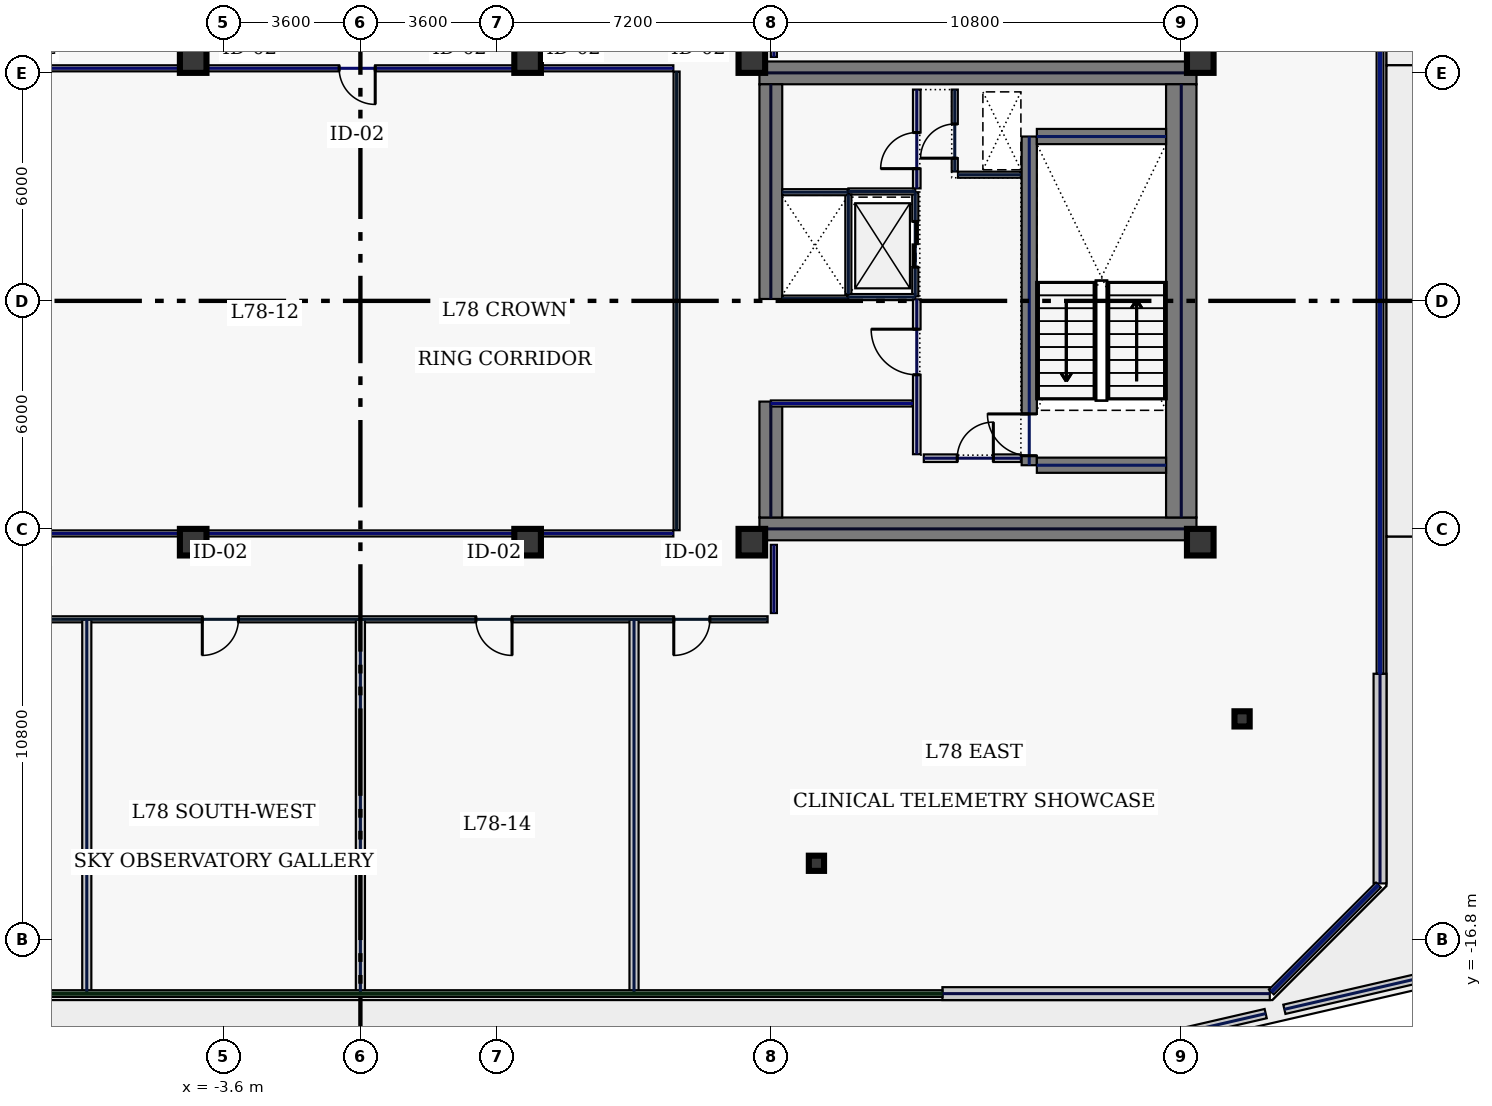
"""IFC4 building model, lengths in metres.
Left out: names, types, materials, properties, quantities, classifications, styles, units other than length and angle.
Written with IfcOpenShell. Run it as: python <this file> out.ifc"""

import sys

from ifc_helpers import new_model, si_unit, direction, frame, frame_2d, origin, origin_2d, place, context, subcontext, project, spatial, rectangle, hollow_rectangle, extrude, element, fill, save


model = new_model("IFC4")
c1 = context("Model", 3, precision=1e-05, world=origin(), true_north=direction((0.0, 1.0)))
c2 = subcontext(c1, "Body", "Model", "MODEL_VIEW")
j1 = project(units=[si_unit("LENGTHUNIT", "METRE"), si_unit("PLANEANGLEUNIT", "RADIAN")], contexts=[c1])
p1 = place(None, origin())
s1 = spatial("IfcSite", under=j1, at=p1, CompositionType="ELEMENT")
p2 = place(p1, origin())
s2 = spatial("IfcBuilding", under=s1, at=p2, CompositionType="ELEMENT")
p3 = place(p2, frame((0.0, 0.0, 333.0)))
s3 = spatial("IfcBuildingStorey", under=s2, at=p3, CompositionType="ELEMENT", Elevation=333.0)
for number, where, z_axis, x_axis in (
    (1, (10.5, 6.0, 0.0), (0.0, 0.0, 1.0), (1.0, 0.0, 0.0)),
    (2, (10.5, -6.0, 0.0), (0.0, 0.0, 1.0), (1.0, 0.0, 0.0)),
):
    element("IfcWall", number, at=place(p3, frame(where, z_axis=z_axis, x_axis=x_axis)), inside=s3, PredefinedType="SHEAR", context=c2, shape_type="SweptSolid", body=[
        extrude(rectangle(XDim=11.5, YDim=0.6, at=frame_2d((5.75, 0.0))), origin(), (0.0, 0.0, 1.0), 6.5),
    ])
p4 = place(p3, frame((21.6, -5.7, 0.0), z_axis=(0.0, 0.0, 1.0), x_axis=(0.0, 1.0, 0.0)))
e3 = element("IfcWall", 3, at=p4, inside=s3, PredefinedType="SHEAR", context=c2, shape_type="SweptSolid", body=[
    extrude(rectangle(XDim=11.4, YDim=0.8, at=frame_2d((5.7, 0.0))), origin(), (0.0, 0.0, 1.0), 6.5),
])
p5 = place(p3, frame((10.8, -5.7, 0.0), z_axis=(0.0, 0.0, 1.0), x_axis=(0.0, 1.0, 0.0)))
e4 = element("IfcWall", 4, at=p5, inside=s3, PredefinedType="SHEAR", context=c2, shape_type="SweptSolid", body=[
    extrude(rectangle(XDim=3.05, YDim=0.6, at=frame_2d((1.525, 0.0))), origin(), (0.0, 0.0, 1.0), 6.5),
])
p6 = place(p3, frame((10.8, 0.05, 0.0), z_axis=(0.0, 0.0, 1.0), x_axis=(0.0, 1.0, 0.0)))
e5 = element("IfcWall", 5, at=p6, inside=s3, PredefinedType="SHEAR", context=c2, shape_type="SweptSolid", body=[
    extrude(rectangle(XDim=5.65, YDim=0.6, at=frame_2d((2.825, 0.0))), origin(), (0.0, 0.0, 1.0), 6.5),
])
p7 = place(p3, frame((17.6, -4.325, 0.0), z_axis=(0.0, 0.0, 1.0), x_axis=(0.0, 1.0, 0.0)))
e6 = element("IfcWall", 6, at=p7, inside=s3, PredefinedType="SHEAR", context=c2, shape_type="SweptSolid", body=[
    extrude(rectangle(XDim=8.65, YDim=0.4, at=frame_2d((4.325, 0.0))), origin(), (0.0, 0.0, 1.0), 6.5),
])
p8 = place(p7, frame((0.25, 0.0, 0.0)))
e7 = element("IfcOpeningElement", 7, at=p8, cuts=e6, PredefinedType="OPENING", context=c2, shape_type="SweptSolid", body=[
    extrude(rectangle(XDim=1.1, YDim=2.2, at=frame_2d((0.55, 1.1))), frame((0.0, 0.21, 0.0), z_axis=(0.0, -1.0, 0.0), x_axis=(1.0, 0.0, 0.0)), (0.0, 0.0, 1.0), 0.42),
])
for number, where, z_axis, x_axis in (
    (8, (17.8, -4.325, 0.0), (0.0, 0.0, 1.0), (1.0, 0.0, 0.0)),
    (9, (17.8, 4.325, 0.0), (0.0, 0.0, 1.0), (1.0, 0.0, 0.0)),
):
    element("IfcWall", number, at=place(p3, frame(where, z_axis=z_axis, x_axis=x_axis)), inside=s3, PredefinedType="SHEAR", context=c2, shape_type="SweptSolid", body=[
        extrude(rectangle(XDim=3.4, YDim=0.4, at=frame_2d((1.7, 0.0))), origin(), (0.0, 0.0, 1.0), 6.5),
    ])
for number, where, z_axis, x_axis in (
    (10, (10.3, -6.35, 0.0), (0.0, 0.0, 1.0), (1.0, 0.0, 0.0)),
    (11, (10.3, 6.35, 0.0), (0.0, 0.0, 1.0), (1.0, 0.0, 0.0)),
    (12, (22.1, -6.35, 0.0), (0.0, 0.0, 1.0), (1.0, 0.0, 0.0)),
    (13, (22.1, 6.35, 0.0), (0.0, 0.0, 1.0), (1.0, 0.0, 0.0)),
    (14, (-4.4, -6.35, 0.0), (0.0, 0.0, 1.0), (1.0, 0.0, 0.0)),
    (15, (4.4, -6.35, 0.0), (0.0, 0.0, 1.0), (1.0, 0.0, 0.0)),
    (16, (-4.4, 6.35, 0.0), (0.0, 0.0, 1.0), (1.0, 0.0, 0.0)),
    (17, (4.4, 6.35, 0.0), (0.0, 0.0, 1.0), (1.0, 0.0, 0.0)),
):
    element("IfcColumn", number, at=place(p3, frame(where, z_axis=z_axis, x_axis=x_axis)), inside=s3, PredefinedType="COLUMN", context=c2, shape_type="SweptSolid", body=[
        extrude(hollow_rectangle(XDim=0.7, YDim=0.7, WallThickness=0.032, at=origin_2d()), origin(), (0.0, 0.0, 1.0), 6.5),
    ])
for number, where, z_axis, x_axis in (
    (18, (23.2, -11.0, 0.0), (0.0, 0.0, 1.0), (1.0, 0.0, 0.0)),
    (19, (0.0, -14.8, 0.0), (0.0, 0.0, 1.0), (1.0, 0.0, 0.0)),
    (20, (12.0, -14.8, 0.0), (0.0, 0.0, 1.0), (1.0, 0.0, 0.0)),
):
    element("IfcColumn", number, at=place(p3, frame(where, z_axis=z_axis, x_axis=x_axis)), inside=s3, PredefinedType="COLUMN", context=c2, shape_type="SweptSolid", body=[
        extrude(hollow_rectangle(XDim=0.4, YDim=0.4, WallThickness=0.02, at=origin_2d()), origin(), (0.0, 0.0, 1.0), 6.5),
    ])
p9 = place(p3, frame((27.356, 10.321, 0.0), z_axis=(0.0, 0.0, 1.0), x_axis=(0.224955106174, -0.974369129338, 0.0)))
e21 = element("IfcWall", 21, at=p9, inside=s3, PredefinedType="PARAPET", context=c2, shape_type="SweptSolid", body=[
    extrude(rectangle(XDim=22.941, YDim=0.25, at=frame_2d((11.47, 0.0))), origin(), (0.0, 0.0, 1.0), 1.15),
])
p10 = place(p3, frame((29.072, -17.544, 0.0), z_axis=(0.0, 0.0, 1.0), x_axis=(-0.974367604085, -0.224961712541, 0.0)))
e22 = element("IfcWall", 22, at=p10, inside=s3, PredefinedType="PARAPET", context=c2, shape_type="SweptSolid", body=[
    extrude(rectangle(XDim=4.885, YDim=0.25, at=frame_2d((2.442, 0.0))), origin(), (0.0, 0.0, 1.0), 1.15),
])
p11 = place(p3, frame((23.822, -18.756, 0.0), z_axis=(0.0, 0.0, 1.0), x_axis=(-0.97437013751, -0.22495073934, 0.0)))
e23 = element("IfcWall", 23, at=p11, inside=s3, PredefinedType="PARAPET", context=c2, shape_type="SweptSolid", body=[
    extrude(rectangle(XDim=48.859, YDim=0.25, at=frame_2d((24.43, 0.0))), origin(), (0.0, 0.0, 1.0), 1.15),
])
p12 = place(p3, frame((26.83, -9.811, 0.0), z_axis=(0.0, 0.0, 1.0), x_axis=(0.0, -1.0, 0.0)))
e24 = element("IfcWall", 24, at=p12, inside=s3, PredefinedType="STANDARD", context=c2, shape_type="SweptSolid", body=[
    extrude(rectangle(XDim=5.518, YDim=0.34, at=frame_2d((2.759, 0.0))), origin(), (0.0, 0.0, 1.0), 6.5),
])
p13 = place(p3, frame((23.93, -18.23, 0.0), z_axis=(0.0, 0.0, 1.0), x_axis=(-1.0, 0.0, 0.0)))
e25 = element("IfcWall", 25, at=p13, inside=s3, PredefinedType="STANDARD", context=c2, shape_type="SweptSolid", body=[
    extrude(rectangle(XDim=8.615, YDim=0.34, at=frame_2d((4.308, 0.0))), origin(), (0.0, 0.0, 1.0), 6.5),
])
p14 = place(p3, frame((14.6, 0.12, 0.0), z_axis=(0.0, 0.0, 1.0), x_axis=(0.0, 1.0, 0.0)))
e26 = element("IfcWall", 26, at=p14, inside=s3, PredefinedType="PARTITIONING", context=c2, shape_type="SweptSolid", body=[
    extrude(rectangle(XDim=2.74, YDim=0.16, at=frame_2d((1.37, 0.0))), origin(), (0.0, 0.0, 1.0), 6.5),
])
p15 = place(p14, frame((0.77, 0.0, 0.0)))
e27 = element("IfcOpeningElement", 27, at=p15, cuts=e26, PredefinedType="OPENING", context=c2, shape_type="SweptSolid", body=[
    extrude(rectangle(XDim=1.2, YDim=2.2, at=frame_2d((0.6, 1.1))), frame((0.0, 0.09, 0.0), z_axis=(0.0, -1.0, 0.0), x_axis=(1.0, 0.0, 0.0)), (0.0, 0.0, 1.0), 0.18),
])
for number, where, z_axis, x_axis in (
    (28, (12.84, 0.1, 0.0), (0.0, 0.0, 1.0), (1.0, 0.0, 0.0)),
    (29, (12.84, 2.88, 0.0), (0.0, 0.0, 1.0), (1.0, 0.0, 0.0)),
):
    element("IfcWall", number, at=place(p3, frame(where, z_axis=z_axis, x_axis=x_axis)), inside=s3, PredefinedType="PARTITIONING", context=c2, shape_type="SweptSolid", body=[
        extrude(rectangle(XDim=1.76, YDim=0.16, at=frame_2d((0.88, 0.0))), origin(), (0.0, 0.0, 1.0), 6.5),
    ])
p16 = place(p3, frame((12.84, 0.18, 0.0), z_axis=(0.0, 0.0, 1.0), x_axis=(0.0, 1.0, 0.0)))
e30 = element("IfcWall", 30, at=p16, inside=s3, PredefinedType="PARTITIONING", context=c2, shape_type="SweptSolid", body=[
    extrude(rectangle(XDim=2.62, YDim=0.16, at=frame_2d((1.31, 0.0))), origin(), (0.0, 0.0, 1.0), 6.5),
])
for number, where, z_axis, x_axis in (
    (31, (11.1, 0.06, 0.0), (0.0, 0.0, 1.0), (1.0, 0.0, 0.0)),
    (32, (11.1, 2.86, 0.0), (0.0, 0.0, 1.0), (1.0, 0.0, 0.0)),
):
    element("IfcWall", number, at=place(p3, frame(where, z_axis=z_axis, x_axis=x_axis)), inside=s3, PredefinedType="PARTITIONING", context=c2, shape_type="SweptSolid", body=[
        extrude(rectangle(XDim=1.72, YDim=0.16, at=frame_2d((0.86, 0.0))), origin(), (0.0, 0.0, 1.0), 6.5),
    ])
p17 = place(p3, frame((15.64, 3.405, 0.0), z_axis=(0.0, 0.0, 1.0), x_axis=(0.0, 1.0, 0.0)))
e33 = element("IfcWall", 33, at=p17, inside=s3, PredefinedType="PARTITIONING", context=c2, shape_type="SweptSolid", body=[
    extrude(rectangle(XDim=2.155, YDim=0.16, at=frame_2d((1.078, 0.0))), origin(), (0.0, 0.0, 1.0), 6.5),
])
p18 = place(p17, frame((0.35, 0.0, 0.0)))
e34 = element("IfcOpeningElement", 34, at=p18, cuts=e33, PredefinedType="OPENING", context=c2, shape_type="SweptSolid", body=[
    extrude(rectangle(XDim=0.9, YDim=2.2, at=frame_2d((0.45, 1.1))), frame((0.0, 0.09, 0.0), z_axis=(0.0, -1.0, 0.0), x_axis=(1.0, 0.0, 0.0)), (0.0, 0.0, 1.0), 0.18),
])
p19 = place(p3, frame((15.725, 3.32, 0.0), z_axis=(0.0, 0.0, 1.0), x_axis=(1.0, 0.0, 0.0)))
e35 = element("IfcWall", 35, at=p19, inside=s3, PredefinedType="PARTITIONING", context=c2, shape_type="SweptSolid", body=[
    extrude(rectangle(XDim=1.655, YDim=0.16, at=frame_2d((0.827, 0.0))), origin(), (0.0, 0.0, 1.0), 6.5),
])
p20 = place(p3, frame((14.825, -4.14, 0.0), z_axis=(0.0, 0.0, 1.0), x_axis=(1.0, 0.0, 0.0)))
e36 = element("IfcWall", 36, at=p20, inside=s3, PredefinedType="SOLIDWALL", context=c2, shape_type="SweptSolid", body=[
    extrude(rectangle(XDim=2.555, YDim=0.2, at=frame_2d((1.277, 0.0))), origin(), (0.0, 0.0, 1.0), 6.5),
])
p21 = place(p20, frame((0.88, 0.0, 0.0)))
e37 = element("IfcOpeningElement", 37, at=p21, cuts=e36, PredefinedType="OPENING", context=c2, shape_type="SweptSolid", body=[
    extrude(rectangle(XDim=0.95, YDim=2.2, at=frame_2d((0.475, 1.1))), frame((0.0, 0.11, 0.0), z_axis=(0.0, -1.0, 0.0), x_axis=(1.0, 0.0, 0.0)), (0.0, 0.0, 1.0), 0.22),
])
p22 = place(p3, frame((10.8, -2.7, 0.0), z_axis=(0.0, 0.0, 1.0), x_axis=(1.0, 0.0, 0.0)))
e38 = element("IfcWall", 38, at=p22, inside=s3, PredefinedType="PARTITIONING", context=c2, shape_type="SweptSolid", body=[
    extrude(rectangle(XDim=3.735, YDim=0.16, at=frame_2d((1.867, 0.0))), origin(), (0.0, 0.0, 1.0), 6.5),
])
p23 = place(p3, frame((14.64, 2.96, 0.0), z_axis=(0.0, 0.0, 1.0), x_axis=(0.0, 1.0, 0.0)))
e39 = element("IfcWall", 39, at=p23, inside=s3, PredefinedType="SOLIDWALL", context=c2, shape_type="SweptSolid", body=[
    extrude(rectangle(XDim=2.6, YDim=0.2, at=frame_2d((1.3, 0.0))), origin(), (0.0, 0.0, 1.0), 6.5),
])
p24 = place(p23, frame((0.52, 0.0, 0.0)))
e40 = element("IfcOpeningElement", 40, at=p24, cuts=e39, PredefinedType="OPENING", context=c2, shape_type="SweptSolid", body=[
    extrude(rectangle(XDim=0.95, YDim=2.2, at=frame_2d((0.475, 1.1))), frame((0.0, 0.11, 0.0), z_axis=(0.0, -1.0, 0.0), x_axis=(1.0, 0.0, 0.0)), (0.0, 0.0, 1.0), 0.22),
])
p25 = place(p3, frame((14.64, -4.035, 0.0), z_axis=(0.0, 0.0, 1.0), x_axis=(0.0, 1.0, 0.0)))
e41 = element("IfcWall", 41, at=p25, inside=s3, PredefinedType="SOLIDWALL", context=c2, shape_type="SweptSolid", body=[
    extrude(rectangle(XDim=4.075, YDim=0.2, at=frame_2d((2.038, 0.0))), origin(), (0.0, 0.0, 1.0), 6.5),
])
p26 = place(p25, frame((2.09, 0.0, 0.0)))
e42 = element("IfcOpeningElement", 42, at=p26, cuts=e41, PredefinedType="OPENING", context=c2, shape_type="SweptSolid", body=[
    extrude(rectangle(XDim=1.2, YDim=2.2, at=frame_2d((0.6, 1.1))), frame((0.0, 0.11, 0.0), z_axis=(0.0, -1.0, 0.0), x_axis=(1.0, 0.0, 0.0)), (0.0, 0.0, 1.0), 0.22),
])
for number, where, z_axis, x_axis in (
    (43, (10.88, 8.215, 0.0), (0.0, 0.0, 1.0), (0.0, -1.0, 0.0)),
    (44, (10.88, -6.42, 0.0), (0.0, 0.0, 1.0), (0.0, -1.0, 0.0)),
):
    element("IfcWall", number, at=place(p3, frame(where, z_axis=z_axis, x_axis=x_axis)), inside=s3, PredefinedType="PARTITIONING", context=c2, shape_type="SweptSolid", body=[
        extrude(rectangle(XDim=1.795, YDim=0.16, at=frame_2d((0.897, 0.0))), origin(), (0.0, 0.0, 1.0), 4.895),
    ])
p27 = place(p3, frame((10.715, -8.38, 0.0), z_axis=(0.0, 0.0, 1.0), x_axis=(-1.0, 0.0, 0.0)))
e45 = element("IfcWall", 45, at=p27, inside=s3, PredefinedType="PARTITIONING", context=c2, shape_type="SweptSolid", body=[
    extrude(rectangle(XDim=21.43, YDim=0.16, at=frame_2d((10.715, 0.0))), origin(), (0.0, 0.0, 1.0), 6.5),
])
p28 = place(p27, frame((13.925, 0.0, 0.0)))
e46 = element("IfcOpeningElement", 46, at=p28, cuts=e45, PredefinedType="OPENING", context=c2, shape_type="SweptSolid", body=[
    extrude(rectangle(XDim=0.95, YDim=2.2, at=frame_2d((0.475, 1.1))), frame((0.0, 0.09, 0.0), z_axis=(0.0, -1.0, 0.0), x_axis=(1.0, 0.0, 0.0)), (0.0, 0.0, 1.0), 0.18),
])
p29 = place(p27, frame((6.725, 0.0, 0.0)))
e47 = element("IfcOpeningElement", 47, at=p29, cuts=e45, PredefinedType="OPENING", context=c2, shape_type="SweptSolid", body=[
    extrude(rectangle(XDim=0.95, YDim=2.2, at=frame_2d((0.475, 1.1))), frame((0.0, 0.09, 0.0), z_axis=(0.0, -1.0, 0.0), x_axis=(1.0, 0.0, 0.0)), (0.0, 0.0, 1.0), 0.18),
])
p30 = place(p27, frame((19.131, 0.0, 0.0)))
e48 = element("IfcOpeningElement", 48, at=p30, cuts=e45, PredefinedType="OPENING", context=c2, shape_type="SweptSolid", body=[
    extrude(rectangle(XDim=0.95, YDim=2.2, at=frame_2d((0.475, 1.1))), frame((0.0, 0.09, 0.0), z_axis=(0.0, -1.0, 0.0), x_axis=(1.0, 0.0, 0.0)), (0.0, 0.0, 1.0), 0.18),
])
p31 = place(p27, frame((1.519, 0.0, 0.0)))
e49 = element("IfcOpeningElement", 49, at=p31, cuts=e45, PredefinedType="OPENING", context=c2, shape_type="SweptSolid", body=[
    extrude(rectangle(XDim=0.95, YDim=2.2, at=frame_2d((0.475, 1.1))), frame((0.0, 0.09, 0.0), z_axis=(0.0, -1.0, 0.0), x_axis=(1.0, 0.0, 0.0)), (0.0, 0.0, 1.0), 0.18),
])
p32 = place(p3, frame((8.32, -6.035, 0.0), z_axis=(0.0, 0.0, 1.0), x_axis=(0.0, 1.0, 0.0)))
e50 = element("IfcWall", 50, at=p32, inside=s3, PredefinedType="PARTITIONING", context=c2, shape_type="SweptSolid", body=[
    extrude(rectangle(XDim=12.07, YDim=0.16, at=frame_2d((6.035, 0.0))), origin(), (0.0, 0.0, 1.0), 6.5),
])
p33 = place(p3, frame((8.235, 6.12, 0.0), z_axis=(0.0, 0.0, 1.0), x_axis=(-1.0, 0.0, 0.0)))
e51 = element("IfcWall", 51, at=p33, inside=s3, PredefinedType="PARTITIONING", context=c2, shape_type="SweptSolid", body=[
    extrude(rectangle(XDim=16.47, YDim=0.16, at=frame_2d((8.235, 0.0))), origin(), (0.0, 0.0, 1.0), 5.795),
])
p34 = place(p33, frame((7.845, 0.0, 0.0)))
e52 = element("IfcOpeningElement", 52, at=p34, cuts=e51, PredefinedType="OPENING", context=c2, shape_type="SweptSolid", body=[
    extrude(rectangle(XDim=0.95, YDim=2.2, at=frame_2d((0.475, 1.1))), frame((0.0, 0.09, 0.0), z_axis=(0.0, -1.0, 0.0), x_axis=(1.0, 0.0, 0.0)), (0.0, 0.0, 1.0), 0.18),
])
p35 = place(p3, frame((-8.235, -6.12, 0.0), z_axis=(0.0, 0.0, 1.0), x_axis=(1.0, 0.0, 0.0)))
e53 = element("IfcWall", 53, at=p35, inside=s3, PredefinedType="PARTITIONING", context=c2, shape_type="SweptSolid", body=[
    extrude(rectangle(XDim=16.47, YDim=0.16, at=frame_2d((8.235, 0.0))), origin(), (0.0, 0.0, 1.0), 5.795),
])
for number, where, z_axis, x_axis in (
    (54, (-7.2, -18.24, 0.0), (0.0, 0.0, 1.0), (0.0, 1.0, 0.0)),
    (55, (7.2, -18.24, 0.0), (0.0, 0.0, 1.0), (0.0, 1.0, 0.0)),
    (56, (0.0, -18.24, 0.0), (0.0, 0.0, 1.0), (0.0, 1.0, 0.0)),
):
    element("IfcWall", number, at=place(p3, frame(where, z_axis=z_axis, x_axis=x_axis)), inside=s3, PredefinedType="PARTITIONING", context=c2, shape_type="SweptSolid", body=[
        extrude(rectangle(XDim=9.855, YDim=0.24, at=frame_2d((4.927, 0.0))), origin(), (0.0, 0.0, 1.0), 6.5),
    ])
p36 = place(p8, origin())
e57 = element("IfcDoor", 57, at=p36, inside=s3, OperationType="SINGLE_SWING_RIGHT", PredefinedType="DOOR", context=c2, shape_type="SweptSolid", body=[
    extrude(rectangle(XDim=1.1, YDim=2.2, at=frame_2d((0.55, 1.1))), frame((0.0, 0.025, 0.0), z_axis=(0.0, -1.0, 0.0), x_axis=(1.0, 0.0, 0.0)), (0.0, 0.0, 1.0), 0.05),
])
fill(e7, e57)
p37 = place(p15, origin())
e58 = element("IfcDoor", 58, at=p37, inside=s3, OperationType="SLIDING_TO_LEFT", PredefinedType="DOOR", context=c2, shape_type="SweptSolid", body=[
    extrude(rectangle(XDim=1.2, YDim=2.2, at=frame_2d((0.6, 1.1))), frame((0.0, 0.025, 0.0), z_axis=(0.0, -1.0, 0.0), x_axis=(1.0, 0.0, 0.0)), (0.0, 0.0, 1.0), 0.05),
])
fill(e27, e58)
p38 = place(p18, origin())
e59 = element("IfcDoor", 59, at=p38, inside=s3, OperationType="SINGLE_SWING_LEFT", PredefinedType="DOOR", context=c2, shape_type="SweptSolid", body=[
    extrude(rectangle(XDim=0.9, YDim=2.2, at=frame_2d((0.45, 1.1))), frame((0.0, 0.025, 0.0), z_axis=(0.0, -1.0, 0.0), x_axis=(1.0, 0.0, 0.0)), (0.0, 0.0, 1.0), 0.05),
])
fill(e34, e59)
p39 = place(p21, origin())
e60 = element("IfcDoor", 60, at=p39, inside=s3, OperationType="SINGLE_SWING_RIGHT", PredefinedType="DOOR", context=c2, shape_type="SweptSolid", body=[
    extrude(rectangle(XDim=0.95, YDim=2.2, at=frame_2d((0.475, 1.1))), frame((0.0, 0.025, 0.0), z_axis=(0.0, -1.0, 0.0), x_axis=(1.0, 0.0, 0.0)), (0.0, 0.0, 1.0), 0.05),
])
fill(e37, e60)
p40 = place(p24, origin())
e61 = element("IfcDoor", 61, at=p40, inside=s3, OperationType="SINGLE_SWING_LEFT", PredefinedType="DOOR", context=c2, shape_type="SweptSolid", body=[
    extrude(rectangle(XDim=0.95, YDim=2.2, at=frame_2d((0.475, 1.1))), frame((0.0, 0.025, 0.0), z_axis=(0.0, -1.0, 0.0), x_axis=(1.0, 0.0, 0.0)), (0.0, 0.0, 1.0), 0.05),
])
fill(e40, e61)
p41 = place(p26, origin())
e62 = element("IfcDoor", 62, at=p41, inside=s3, OperationType="SINGLE_SWING_RIGHT", PredefinedType="DOOR", context=c2, shape_type="SweptSolid", body=[
    extrude(rectangle(XDim=1.2, YDim=2.2, at=frame_2d((0.6, 1.1))), frame((0.0, 0.025, 0.0), z_axis=(0.0, -1.0, 0.0), x_axis=(1.0, 0.0, 0.0)), (0.0, 0.0, 1.0), 0.05),
])
fill(e42, e62)
p42 = place(p34, origin())
e63 = element("IfcDoor", 63, at=p42, inside=s3, OperationType="SINGLE_SWING_LEFT", PredefinedType="DOOR", context=c2, shape_type="SweptSolid", body=[
    extrude(rectangle(XDim=0.95, YDim=2.2, at=frame_2d((0.475, 1.1))), frame((0.0, 0.025, 0.0), z_axis=(0.0, -1.0, 0.0), x_axis=(1.0, 0.0, 0.0)), (0.0, 0.0, 1.0), 0.05),
])
fill(e52, e63)
p43 = place(p28, origin())
e64 = element("IfcDoor", 64, at=p43, inside=s3, OperationType="SINGLE_SWING_RIGHT", PredefinedType="DOOR", context=c2, shape_type="SweptSolid", body=[
    extrude(rectangle(XDim=0.95, YDim=2.2, at=frame_2d((0.475, 1.1))), frame((0.0, 0.025, 0.0), z_axis=(0.0, -1.0, 0.0), x_axis=(1.0, 0.0, 0.0)), (0.0, 0.0, 1.0), 0.05),
])
fill(e46, e64)
p44 = place(p29, origin())
e65 = element("IfcDoor", 65, at=p44, inside=s3, OperationType="SINGLE_SWING_LEFT", PredefinedType="DOOR", context=c2, shape_type="SweptSolid", body=[
    extrude(rectangle(XDim=0.95, YDim=2.2, at=frame_2d((0.475, 1.1))), frame((0.0, 0.025, 0.0), z_axis=(0.0, -1.0, 0.0), x_axis=(1.0, 0.0, 0.0)), (0.0, 0.0, 1.0), 0.05),
])
fill(e47, e65)
p45 = place(p31, origin())
e66 = element("IfcDoor", 66, at=p45, inside=s3, OperationType="SINGLE_SWING_RIGHT", PredefinedType="DOOR", context=c2, shape_type="SweptSolid", body=[
    extrude(rectangle(XDim=0.95, YDim=2.2, at=frame_2d((0.475, 1.1))), frame((0.0, 0.025, 0.0), z_axis=(0.0, -1.0, 0.0), x_axis=(1.0, 0.0, 0.0)), (0.0, 0.0, 1.0), 0.05),
])
fill(e49, e66)
save(model, sys.argv[1])
